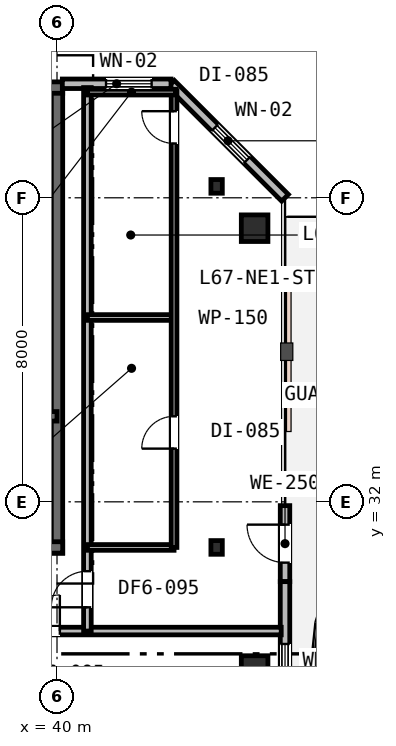
"""IFC4 building model, lengths in metres.
Left out: names, types, materials, properties, quantities, classifications, styles, units other than length and angle.
Written with IfcOpenShell. Run it as: python <this file> out.ifc"""

import sys

from ifc_helpers import new_model, si_unit, direction, frame, frame_2d, origin, origin_2d, place, context, subcontext, project, spatial, rectangle, i_section, extrude, element, fill, save


model = new_model("IFC4")
c1 = context("Model", 3, precision=1e-05, world=origin(), true_north=direction((0.0, 1.0)))
c2 = subcontext(c1, "Body", "Model", "MODEL_VIEW")
j1 = project(units=[si_unit("LENGTHUNIT", "METRE"), si_unit("PLANEANGLEUNIT", "RADIAN")], contexts=[c1])
p1 = place(None, origin())
s1 = spatial("IfcSite", under=j1, at=p1, CompositionType="ELEMENT")
p2 = place(p1, origin())
s2 = spatial("IfcBuilding", under=s1, at=p2, CompositionType="ELEMENT")
p3 = place(p2, frame((0.0, 0.0, 260.2)))
s3 = spatial("IfcBuildingStorey", under=s2, at=p3, CompositionType="ELEMENT", Elevation=260.2)
p4 = place(p3, frame((40.0, 30.65, 0.0), z_axis=(0.0, 0.0, 1.0), x_axis=(0.0, 1.0, 0.0)))
e1 = element("IfcWall", 1, at=p4, inside=s3, PredefinedType="SHEAR", context=c2, shape_type="SweptSolid", body=[
    extrude(rectangle(XDim=12.3, YDim=0.3, at=frame_2d((6.15, 0.0))), origin(), (0.0, 0.0, 1.0), 3.8),
])
p5 = place(p3, frame((15.85, 42.9, 0.0), z_axis=(0.0, 0.0, 1.0), x_axis=(1.0, 0.0, 0.0)))
e2 = element("IfcWall", 2, at=p5, inside=s3, PredefinedType="SHEAR", context=c2, shape_type="SweptSolid", body=[
    extrude(rectangle(XDim=24.3, YDim=0.3, at=frame_2d((12.15, 0.0))), origin(), (0.0, 0.0, 1.0), 3.8),
])
p6 = place(p5, frame((1.6, 0.0, 0.95)))
e3 = element("IfcOpeningElement", 3, at=p6, cuts=e2, PredefinedType="OPENING", context=c2, shape_type="SweptSolid", body=[
    extrude(rectangle(XDim=1.2, YDim=1.6, at=frame_2d((0.6, 0.8))), frame((0.0, 0.16, 0.0), z_axis=(0.0, -1.0, 0.0), x_axis=(1.0, 0.0, 0.0)), (0.0, 0.0, 1.0), 0.32),
])
p7 = place(p5, frame((16.5, 0.0, 0.95)))
e4 = element("IfcOpeningElement", 4, at=p7, cuts=e2, PredefinedType="OPENING", context=c2, shape_type="SweptSolid", body=[
    extrude(rectangle(XDim=1.2, YDim=1.6, at=frame_2d((0.6, 0.8))), frame((0.0, 0.16, 0.0), z_axis=(0.0, -1.0, 0.0), x_axis=(1.0, 0.0, 0.0)), (0.0, 0.0, 1.0), 0.32),
])
p8 = place(p5, frame((21.6, 0.0, 0.95)))
e5 = element("IfcOpeningElement", 5, at=p8, cuts=e2, PredefinedType="OPENING", context=c2, shape_type="SweptSolid", body=[
    extrude(rectangle(XDim=1.2, YDim=1.6, at=frame_2d((0.6, 0.8))), frame((0.0, 0.16, 0.0), z_axis=(0.0, -1.0, 0.0), x_axis=(1.0, 0.0, 0.0)), (0.0, 0.0, 1.0), 0.32),
])
p9 = place(p3, frame((28.95, 30.8, 0.0), z_axis=(0.0, 0.0, 1.0), x_axis=(1.0, 0.0, 0.0)))
e6 = element("IfcWall", 6, at=p9, inside=s3, PredefinedType="SHEAR", context=c2, shape_type="SweptSolid", body=[
    extrude(rectangle(XDim=11.2, YDim=0.3, at=frame_2d((5.6, 0.0))), origin(), (0.0, 0.0, 1.0), 3.8),
])
p10 = place(p9, frame((7.65, 0.0, 0.0)))
e7 = element("IfcOpeningElement", 7, at=p10, cuts=e6, PredefinedType="OPENING", context=c2, shape_type="SweptSolid", body=[
    extrude(rectangle(XDim=1.1, YDim=2.15, at=frame_2d((0.55, 1.075))), frame((0.0, 0.16, 0.0), z_axis=(0.0, -1.0, 0.0), x_axis=(1.0, 0.0, 0.0)), (0.0, 0.0, 1.0), 0.32),
])
p11 = place(p3, frame((33.95, 34.25, 0.0), z_axis=(0.0, 0.0, 1.0), x_axis=(1.0, 0.0, 0.0)))
e8 = element("IfcWall", 8, at=p11, inside=s3, PredefinedType="SHEAR", context=c2, shape_type="SweptSolid", body=[
    extrude(rectangle(XDim=6.05, YDim=0.25, at=frame_2d((3.025, 0.0))), origin(), (0.0, 0.0, 1.0), 3.8),
])
p12 = place(p11, frame((3.7, 0.0, 0.0)))
e9 = element("IfcOpeningElement", 9, at=p12, cuts=e8, PredefinedType="OPENING", context=c2, shape_type="SweptSolid", body=[
    extrude(rectangle(XDim=1.0, YDim=2.15, at=frame_2d((0.5, 1.075))), frame((0.0, 0.135, 0.0), z_axis=(0.0, -1.0, 0.0), x_axis=(1.0, 0.0, 0.0)), (0.0, 0.0, 1.0), 0.27),
])
p13 = place(p11, frame((0.55, 0.0, 0.0)))
e10 = element("IfcOpeningElement", 10, at=p13, cuts=e8, PredefinedType="OPENING", context=c2, shape_type="SweptSolid", body=[
    extrude(rectangle(XDim=1.1, YDim=2.15, at=frame_2d((0.55, 1.075))), frame((0.0, 0.135, 0.0), z_axis=(0.0, -1.0, 0.0), x_axis=(1.0, 0.0, 0.0)), (0.0, 0.0, 1.0), 0.27),
])
for number, where, z_axis, x_axis in (
    (11, (45.2, 27.6, 0.0), (0.0, 0.0, 1.0), (1.0, 0.0, 0.0)),
    (12, (45.2, 39.2, 0.0), (0.0, 0.0, 1.0), (1.0, 0.0, 0.0)),
):
    element("IfcColumn", number, at=place(p3, frame(where, z_axis=z_axis, x_axis=x_axis)), inside=s3, PredefinedType="COLUMN", context=c2, shape_type="SweptSolid", body=[
        extrude(rectangle(XDim=0.7, YDim=0.7, at=origin_2d()), origin(), (0.0, 0.0, 1.0), 3.8),
    ])
for number, where, z_axis, x_axis in (
    (13, (44.2, 30.8, 0.0), (0.0, 0.0, 1.0), (1.0, 0.0, 0.0)),
    (14, (44.2, 40.3, 0.0), (0.0, 0.0, 1.0), (1.0, 0.0, 0.0)),
):
    element("IfcColumn", number, at=place(p3, frame(where, z_axis=z_axis, x_axis=x_axis)), inside=s3, PredefinedType="COLUMN", context=c2, shape_type="SweptSolid", body=[
        extrude(i_section(OverallWidth=0.3, OverallDepth=0.36, WebThickness=0.013, FlangeThickness=0.022, FilletRadius=0.027, at=origin_2d()), origin(), (0.0, 0.0, 1.0), 3.8),
    ])
p14 = place(p3, frame((46.0, 29.9, 0.0), z_axis=(0.0, 0.0, 1.0), x_axis=(0.0, 1.0, 0.0)))
e15 = element("IfcWall", 15, at=p14, inside=s3, PredefinedType="STANDARD", context=c2, shape_type="SweptSolid", body=[
    extrude(rectangle(XDim=2.0, YDim=0.25, at=frame_2d((1.0, 0.0))), origin(), (0.0, 0.0, 1.0), 3.53),
])
p15 = place(p14, frame((0.5, 0.0, 0.0)))
e16 = element("IfcOpeningElement", 16, at=p15, cuts=e15, PredefinedType="OPENING", context=c2, shape_type="SweptSolid", body=[
    extrude(rectangle(XDim=1.0, YDim=2.15, at=frame_2d((0.5, 1.075))), frame((0.0, 0.135, 0.0), z_axis=(0.0, -1.0, 0.0), x_axis=(1.0, 0.0, 0.0)), (0.0, 0.0, 1.0), 0.27),
])
p16 = place(p3, frame((46.0, 27.0, 0.0), z_axis=(0.0, 0.0, 1.0), x_axis=(0.0, 1.0, 0.0)))
e17 = element("IfcWall", 17, at=p16, inside=s3, PredefinedType="STANDARD", context=c2, shape_type="SweptSolid", body=[
    extrude(rectangle(XDim=2.9, YDim=0.25, at=frame_2d((1.45, 0.0))), origin(), (0.0, 0.0, 1.0), 3.53),
])
p17 = place(p16, frame((0.36, 0.0, 0.9)))
e18 = element("IfcOpeningElement", 18, at=p17, cuts=e17, PredefinedType="OPENING", context=c2, shape_type="SweptSolid", body=[
    extrude(rectangle(XDim=0.9, YDim=1.55, at=frame_2d((0.45, 0.775))), frame((0.0, 0.135, 0.0), z_axis=(0.0, -1.0, 0.0), x_axis=(1.0, 0.0, 0.0)), (0.0, 0.0, 1.0), 0.27),
])
p18 = place(p3, frame((46.0, 40.0, 0.0), z_axis=(0.0, 0.0, 1.0), x_axis=(-0.707106781187, 0.707106781187, 0.0)))
e19 = element("IfcWall", 19, at=p18, inside=s3, PredefinedType="STANDARD", context=c2, shape_type="SweptSolid", body=[
    extrude(rectangle(XDim=4.243, YDim=0.25, at=frame_2d((2.121, 0.0))), origin(), (0.0, 0.0, 1.0), 3.53),
])
p19 = place(p18, frame((1.411, 0.0, 0.85)))
e20 = element("IfcOpeningElement", 20, at=p19, cuts=e19, PredefinedType="OPENING", context=c2, shape_type="SweptSolid", body=[
    extrude(rectangle(XDim=1.2, YDim=1.6, at=frame_2d((0.6, 0.8))), frame((0.0, 0.135, 0.0), z_axis=(0.0, -1.0, 0.0), x_axis=(1.0, 0.0, 0.0)), (0.0, 0.0, 1.0), 0.27),
])
p20 = place(p3, frame((43.0, 43.0, 0.0), z_axis=(0.0, 0.0, 1.0), x_axis=(-1.0, 0.0, 0.0)))
e21 = element("IfcWall", 21, at=p20, inside=s3, PredefinedType="STANDARD", context=c2, shape_type="SweptSolid", body=[
    extrude(rectangle(XDim=2.86, YDim=0.25, at=frame_2d((1.43, 0.0))), origin(), (0.0, 0.0, 1.0), 3.53),
])
p21 = place(p20, frame((0.51, 0.0, 0.85)))
e22 = element("IfcOpeningElement", 22, at=p21, cuts=e21, PredefinedType="OPENING", context=c2, shape_type="SweptSolid", body=[
    extrude(rectangle(XDim=1.2, YDim=1.6, at=frame_2d((0.6, 0.8))), frame((0.0, 0.135, 0.0), z_axis=(0.0, -1.0, 0.0), x_axis=(1.0, 0.0, 0.0)), (0.0, 0.0, 1.0), 0.27),
])
p22 = place(p3, frame((21.6, 28.6, 0.0), z_axis=(0.0, 0.0, 1.0), x_axis=(1.0, 0.0, 0.0)))
e23 = element("IfcWall", 23, at=p22, inside=s3, PredefinedType="PARTITIONING", context=c2, shape_type="SweptSolid", body=[
    extrude(rectangle(XDim=24.3, YDim=0.2, at=frame_2d((12.15, 0.0))), origin(), (0.0, 0.0, 1.0), 3.16),
])
p23 = place(p22, frame((5.925, 0.0, 0.0)))
e24 = element("IfcOpeningElement", 24, at=p23, cuts=e23, PredefinedType="OPENING", context=c2, shape_type="SweptSolid", body=[
    extrude(rectangle(XDim=0.95, YDim=2.15, at=frame_2d((0.475, 1.075))), frame((0.0, 0.11, 0.0), z_axis=(0.0, -1.0, 0.0), x_axis=(1.0, 0.0, 0.0)), (0.0, 0.0, 1.0), 0.22),
])
p24 = place(p22, frame((17.525, 0.0, 0.0)))
e25 = element("IfcOpeningElement", 25, at=p24, cuts=e23, PredefinedType="OPENING", context=c2, shape_type="SweptSolid", body=[
    extrude(rectangle(XDim=0.95, YDim=2.15, at=frame_2d((0.475, 1.075))), frame((0.0, 0.11, 0.0), z_axis=(0.0, -1.0, 0.0), x_axis=(1.0, 0.0, 0.0)), (0.0, 0.0, 1.0), 0.22),
])
p25 = place(p3, frame((40.8, 28.6, 0.0), z_axis=(0.0, 0.0, 1.0), x_axis=(0.0, 1.0, 0.0)))
e26 = element("IfcWall", 26, at=p25, inside=s3, PredefinedType="PARTITIONING", context=c2, shape_type="SweptSolid", body=[
    extrude(rectangle(XDim=14.3, YDim=0.2, at=frame_2d((7.15, 0.0))), origin(), (0.0, 0.0, 1.0), 3.16),
])
p26 = place(p25, frame((0.625, 0.0, 0.0)))
e27 = element("IfcOpeningElement", 27, at=p26, cuts=e26, PredefinedType="OPENING", context=c2, shape_type="SweptSolid", body=[
    extrude(rectangle(XDim=0.95, YDim=2.15, at=frame_2d((0.475, 1.075))), frame((0.0, 0.11, 0.0), z_axis=(0.0, -1.0, 0.0), x_axis=(1.0, 0.0, 0.0)), (0.0, 0.0, 1.0), 0.22),
])
p27 = place(p3, frame((40.8, 30.8, 0.0), z_axis=(0.0, 0.0, 1.0), x_axis=(1.0, 0.0, 0.0)))
e28 = element("IfcWall", 28, at=p27, inside=s3, PredefinedType="PARTITIONING", context=c2, shape_type="SweptSolid", body=[
    extrude(rectangle(XDim=2.28, YDim=0.15, at=frame_2d((1.14, 0.0))), origin(), (0.0, 0.0, 1.0), 3.16),
])
p28 = place(p3, frame((40.8, 36.85, 0.0), z_axis=(0.0, 0.0, 1.0), x_axis=(1.0, 0.0, 0.0)))
e29 = element("IfcWall", 29, at=p28, inside=s3, PredefinedType="PARTITIONING", context=c2, shape_type="SweptSolid", body=[
    extrude(rectangle(XDim=2.28, YDim=0.15, at=frame_2d((1.14, 0.0))), origin(), (0.0, 0.0, 1.0), 3.53),
])
p29 = place(p3, frame((43.08, 30.8, 0.0), z_axis=(0.0, 0.0, 1.0), x_axis=(0.0, 1.0, 0.0)))
e30 = element("IfcWall", 30, at=p29, inside=s3, PredefinedType="PARTITIONING", context=c2, shape_type="SweptSolid", body=[
    extrude(rectangle(XDim=12.02, YDim=0.15, at=frame_2d((6.01, 0.0))), origin(), (0.0, 0.0, 1.0), 3.16),
])
p30 = place(p29, frame((2.6, 0.0, 0.0)))
e31 = element("IfcOpeningElement", 31, at=p30, cuts=e30, PredefinedType="OPENING", context=c2, shape_type="SweptSolid", body=[
    extrude(rectangle(XDim=0.85, YDim=2.15, at=frame_2d((0.425, 1.075))), frame((0.0, 0.085, 0.0), z_axis=(0.0, -1.0, 0.0), x_axis=(1.0, 0.0, 0.0)), (0.0, 0.0, 1.0), 0.17),
])
p31 = place(p29, frame((10.629, 0.0, 0.0)))
e32 = element("IfcOpeningElement", 32, at=p31, cuts=e30, PredefinedType="OPENING", context=c2, shape_type="SweptSolid", body=[
    extrude(rectangle(XDim=0.85, YDim=2.15, at=frame_2d((0.425, 1.075))), frame((0.0, 0.085, 0.0), z_axis=(0.0, -1.0, 0.0), x_axis=(1.0, 0.0, 0.0)), (0.0, 0.0, 1.0), 0.17),
])
p32 = place(p3, frame((40.8, 42.78, 0.0), z_axis=(0.0, 0.0, 1.0), x_axis=(1.0, 0.0, 0.0)))
e33 = element("IfcWall", 33, at=p32, inside=s3, PredefinedType="PARTITIONING", context=c2, shape_type="SweptSolid", body=[
    extrude(rectangle(XDim=2.32, YDim=0.15, at=frame_2d((1.16, 0.0))), origin(), (0.0, 0.0, 1.0), 3.53),
])
p33 = place(p15, origin())
e34 = element("IfcDoor", 34, at=p33, inside=s3, OperationType="SINGLE_SWING_RIGHT", PredefinedType="DOOR", context=c2, shape_type="SweptSolid", body=[
    extrude(rectangle(XDim=1.0, YDim=2.15, at=frame_2d((0.5, 1.075))), frame((0.0, 0.025, 0.0), z_axis=(0.0, -1.0, 0.0), x_axis=(1.0, 0.0, 0.0)), (0.0, 0.0, 1.0), 0.05),
])
fill(e16, e34)
p34 = place(p17, origin())
e35 = element("IfcWindow", 35, at=p34, inside=s3, PartitioningType="SINGLE_PANEL", PredefinedType="WINDOW", context=c2, shape_type="SweptSolid", body=[
    extrude(rectangle(XDim=0.9, YDim=1.55, at=frame_2d((0.45, 0.775))), frame((0.0, 0.03, 0.0), z_axis=(0.0, -1.0, 0.0), x_axis=(1.0, 0.0, 0.0)), (0.0, 0.0, 1.0), 0.06),
])
fill(e18, e35)
p35 = place(p19, origin())
e36 = element("IfcWindow", 36, at=p35, inside=s3, PartitioningType="SINGLE_PANEL", PredefinedType="WINDOW", context=c2, shape_type="SweptSolid", body=[
    extrude(rectangle(XDim=1.2, YDim=1.6, at=frame_2d((0.6, 0.8))), frame((0.0, 0.03, 0.0), z_axis=(0.0, -1.0, 0.0), x_axis=(1.0, 0.0, 0.0)), (0.0, 0.0, 1.0), 0.06),
])
fill(e20, e36)
p36 = place(p21, origin())
e37 = element("IfcWindow", 37, at=p36, inside=s3, PartitioningType="SINGLE_PANEL", PredefinedType="WINDOW", context=c2, shape_type="SweptSolid", body=[
    extrude(rectangle(XDim=1.2, YDim=1.6, at=frame_2d((0.6, 0.8))), frame((0.0, 0.03, 0.0), z_axis=(0.0, -1.0, 0.0), x_axis=(1.0, 0.0, 0.0)), (0.0, 0.0, 1.0), 0.06),
])
fill(e22, e37)
p37 = place(p26, origin())
e38 = element("IfcDoor", 38, at=p37, inside=s3, OperationType="SINGLE_SWING_LEFT", PredefinedType="DOOR", context=c2, shape_type="SweptSolid", body=[
    extrude(rectangle(XDim=0.95, YDim=2.15, at=frame_2d((0.475, 1.075))), frame((0.0, 0.025, 0.0), z_axis=(0.0, -1.0, 0.0), x_axis=(1.0, 0.0, 0.0)), (0.0, 0.0, 1.0), 0.05),
])
fill(e27, e38)
p38 = place(p30, origin())
e39 = element("IfcDoor", 39, at=p38, inside=s3, OperationType="SINGLE_SWING_LEFT", PredefinedType="DOOR", context=c2, shape_type="SweptSolid", body=[
    extrude(rectangle(XDim=0.85, YDim=2.15, at=frame_2d((0.425, 1.075))), frame((0.0, 0.025, 0.0), z_axis=(0.0, -1.0, 0.0), x_axis=(1.0, 0.0, 0.0)), (0.0, 0.0, 1.0), 0.05),
])
fill(e31, e39)
p39 = place(p31, origin())
e40 = element("IfcDoor", 40, at=p39, inside=s3, OperationType="SINGLE_SWING_RIGHT", PredefinedType="DOOR", context=c2, shape_type="SweptSolid", body=[
    extrude(rectangle(XDim=0.85, YDim=2.15, at=frame_2d((0.425, 1.075))), frame((0.0, 0.025, 0.0), z_axis=(0.0, -1.0, 0.0), x_axis=(1.0, 0.0, 0.0)), (0.0, 0.0, 1.0), 0.05),
])
fill(e32, e40)
p40 = place(p24, origin())
e41 = element("IfcDoor", 41, at=p40, inside=s3, OperationType="SINGLE_SWING_RIGHT", PredefinedType="DOOR", context=c2, shape_type="SweptSolid", body=[
    extrude(rectangle(XDim=0.95, YDim=2.15, at=frame_2d((0.475, 1.075))), frame((0.0, 0.025, 0.0), z_axis=(0.0, -1.0, 0.0), x_axis=(1.0, 0.0, 0.0)), (0.0, 0.0, 1.0), 0.05),
])
fill(e25, e41)
save(model, sys.argv[1])
